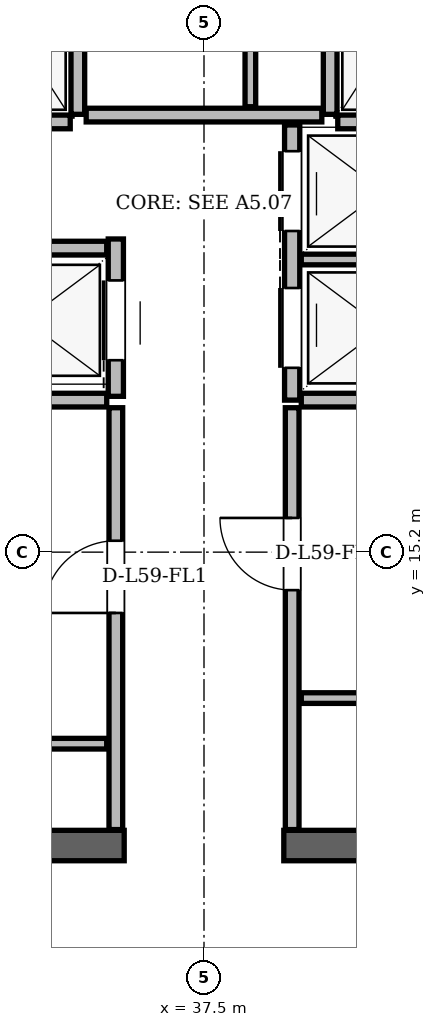
"""IFC4 building model, lengths in metres.
Left out: names, types, materials, properties, quantities, classifications, styles, units other than length and angle.
Written with IfcOpenShell. Run it as: python <this file> out.ifc"""

import sys

from ifc_helpers import new_model, si_unit, direction, frame, frame_2d, origin, place, context, subcontext, project, spatial, rectangle, extrude, element, fill, save


model = new_model("IFC4")
c1 = context("Model", 3, precision=1e-05, world=origin(), true_north=direction((0.0, 1.0)))
c2 = subcontext(c1, "Body", "Model", "MODEL_VIEW")
j1 = project(units=[si_unit("LENGTHUNIT", "METRE"), si_unit("PLANEANGLEUNIT", "RADIAN")], contexts=[c1])
p1 = place(None, origin())
s1 = spatial("IfcSite", under=j1, at=p1, CompositionType="ELEMENT")
p2 = place(p1, origin())
s2 = spatial("IfcBuilding", under=s1, at=p2, CompositionType="ELEMENT")
p3 = place(p2, frame((0.0, 0.0, 223.5)))
s3 = spatial("IfcBuildingStorey", under=s2, at=p3, CompositionType="ELEMENT", Elevation=223.5)
for number, where, z_axis, x_axis in (
    (1, (29.35, 11.34, 0.0), (0.0, 0.0, 1.0), (1.0, 0.0, 0.0)),
    (2, (38.55, 11.34, 0.0), (0.0, 0.0, 1.0), (1.0, 0.0, 0.0)),
):
    element("IfcWall", number, at=place(p3, frame(where, z_axis=z_axis, x_axis=x_axis)), inside=s3, PredefinedType="SHEAR", context=c2, shape_type="SweptSolid", body=[
        extrude(rectangle(XDim=7.1, YDim=0.4, at=frame_2d((3.55, 0.0))), origin(), (0.0, 0.0, 1.0), 3.38),
    ])
p4 = place(p3, frame((35.84, 20.96, 0.0), z_axis=(0.0, 0.0, 1.0), x_axis=(0.0, 1.0, 0.0)))
e3 = element("IfcWall", 3, at=p4, inside=s3, PredefinedType="PARTITIONING", context=c2, shape_type="SweptSolid", body=[
    extrude(rectangle(XDim=3.02, YDim=0.18, at=frame_2d((1.51, 0.0))), origin(), (0.0, 0.0, 1.0), 3.38),
])
p5 = place(p3, frame((34.16, 20.86, 0.0), z_axis=(0.0, 0.0, 1.0), x_axis=(1.0, 0.0, 0.0)))
e4 = element("IfcWall", 4, at=p5, inside=s3, PredefinedType="PARTITIONING", context=c2, shape_type="SweptSolid", body=[
    extrude(rectangle(XDim=1.58, YDim=0.18, at=frame_2d((0.79, 0.0))), origin(), (0.0, 0.0, 1.0), 3.38),
])
p6 = place(p3, frame((39.16, 20.96, 0.0), z_axis=(0.0, 0.0, 1.0), x_axis=(0.0, 1.0, 0.0)))
e5 = element("IfcWall", 5, at=p6, inside=s3, PredefinedType="PARTITIONING", context=c2, shape_type="SweptSolid", body=[
    extrude(rectangle(XDim=3.02, YDim=0.18, at=frame_2d((1.51, 0.0))), origin(), (0.0, 0.0, 1.0), 3.38),
])
p7 = place(p3, frame((39.26, 20.86, 0.0), z_axis=(0.0, 0.0, 1.0), x_axis=(1.0, 0.0, 0.0)))
e6 = element("IfcWall", 6, at=p7, inside=s3, PredefinedType="PARTITIONING", context=c2, shape_type="SweptSolid", body=[
    extrude(rectangle(XDim=1.58, YDim=0.18, at=frame_2d((0.79, 0.0))), origin(), (0.0, 0.0, 1.0), 3.38),
])
p8 = place(p3, frame((36.34, 17.25, 0.0), z_axis=(0.0, 0.0, 1.0), x_axis=(0.0, 1.0, 0.0)))
e7 = element("IfcWall", 7, at=p8, inside=s3, PredefinedType="PARTITIONING", context=c2, shape_type="SweptSolid", body=[
    extrude(rectangle(XDim=2.07, YDim=0.2, at=frame_2d((1.035, 0.0))), origin(), (0.0, 0.0, 1.0), 3.38),
])
p9 = place(p8, frame((0.475, 0.0, 0.0)))
e8 = element("IfcOpeningElement", 8, at=p9, cuts=e7, PredefinedType="OPENING", context=c2, shape_type="SweptSolid", body=[
    extrude(rectangle(XDim=1.05, YDim=2.15, at=frame_2d((0.525, 1.075))), frame((0.0, 0.1, 0.0), z_axis=(0.0, -1.0, 0.0), x_axis=(1.0, 0.0, 0.0)), (0.0, 0.0, 1.0), 0.2),
])
p10 = place(p3, frame((33.95, 19.2, 0.0), z_axis=(0.0, 0.0, 1.0), x_axis=(1.0, 0.0, 0.0)))
e9 = element("IfcWall", 9, at=p10, inside=s3, PredefinedType="PARTITIONING", context=c2, shape_type="SweptSolid", body=[
    extrude(rectangle(XDim=2.27, YDim=0.18, at=frame_2d((1.135, 0.0))), origin(), (0.0, 0.0, 1.0), 3.38),
])
p11 = place(p3, frame((33.56, 17.2, 0.0), z_axis=(0.0, 0.0, 1.0), x_axis=(1.0, 0.0, 0.0)))
e10 = element("IfcWall", 10, at=p11, inside=s3, PredefinedType="PARTITIONING", context=c2, shape_type="SweptSolid", body=[
    extrude(rectangle(XDim=2.66, YDim=0.18, at=frame_2d((1.33, 0.0))), origin(), (0.0, 0.0, 1.0), 3.38),
])
p12 = place(p3, frame((36.34, 11.55, 0.0), z_axis=(0.0, 0.0, 1.0), x_axis=(0.0, 1.0, 0.0)))
e11 = element("IfcWall", 11, at=p12, inside=s3, PredefinedType="PARTITIONING", context=c2, shape_type="SweptSolid", body=[
    extrude(rectangle(XDim=5.55, YDim=0.18, at=frame_2d((2.775, 0.0))), origin(), (0.0, 0.0, 1.0), 3.38),
])
p13 = place(p12, frame((2.85, 0.0, 0.0)))
e12 = element("IfcOpeningElement", 12, at=p13, cuts=e11, PredefinedType="OPENING", context=c2, shape_type="SweptSolid", body=[
    extrude(rectangle(XDim=0.95, YDim=2.1, at=frame_2d((0.475, 1.05))), frame((0.0, 0.09, 0.0), z_axis=(0.0, -1.0, 0.0), x_axis=(1.0, 0.0, 0.0)), (0.0, 0.0, 1.0), 0.18),
])
p14 = place(p3, frame((33.56, 12.68, 0.0), z_axis=(0.0, 0.0, 1.0), x_axis=(1.0, 0.0, 0.0)))
e13 = element("IfcWall", 13, at=p14, inside=s3, PredefinedType="PARTITIONING", context=c2, shape_type="SweptSolid", body=[
    extrude(rectangle(XDim=2.66, YDim=0.14, at=frame_2d((1.33, 0.0))), origin(), (0.0, 0.0, 1.0), 3.38),
])
p15 = place(p3, frame((38.66, 17.2, 0.0), z_axis=(0.0, 0.0, 1.0), x_axis=(0.0, 1.0, 0.0)))
e14 = element("IfcWall", 14, at=p15, inside=s3, PredefinedType="PARTITIONING", context=c2, shape_type="SweptSolid", body=[
    extrude(rectangle(XDim=3.62, YDim=0.2, at=frame_2d((1.81, 0.0))), origin(), (0.0, 0.0, 1.0), 3.38),
])
p16 = place(p15, frame((0.425, 0.0, 0.0)))
e15 = element("IfcOpeningElement", 15, at=p16, cuts=e14, PredefinedType="OPENING", context=c2, shape_type="SweptSolid", body=[
    extrude(rectangle(XDim=1.05, YDim=2.15, at=frame_2d((0.525, 1.075))), frame((0.0, 0.1, 0.0), z_axis=(0.0, -1.0, 0.0), x_axis=(1.0, 0.0, 0.0)), (0.0, 0.0, 1.0), 0.2),
])
p17 = place(p15, frame((2.225, 0.0, 0.0)))
e16 = element("IfcOpeningElement", 16, at=p17, cuts=e14, PredefinedType="OPENING", context=c2, shape_type="SweptSolid", body=[
    extrude(rectangle(XDim=1.05, YDim=2.15, at=frame_2d((0.525, 1.075))), frame((0.0, 0.1, 0.0), z_axis=(0.0, -1.0, 0.0), x_axis=(1.0, 0.0, 0.0)), (0.0, 0.0, 1.0), 0.2),
])
p18 = place(p3, frame((38.78, 17.2, 0.0), z_axis=(0.0, 0.0, 1.0), x_axis=(1.0, 0.0, 0.0)))
e17 = element("IfcWall", 17, at=p18, inside=s3, PredefinedType="PARTITIONING", context=c2, shape_type="SweptSolid", body=[
    extrude(rectangle(XDim=2.66, YDim=0.18, at=frame_2d((1.33, 0.0))), origin(), (0.0, 0.0, 1.0), 3.38),
])
p19 = place(p3, frame((38.78, 19.05, 0.0), z_axis=(0.0, 0.0, 1.0), x_axis=(1.0, 0.0, 0.0)))
e18 = element("IfcWall", 18, at=p19, inside=s3, PredefinedType="PARTITIONING", context=c2, shape_type="SweptSolid", body=[
    extrude(rectangle(XDim=2.66, YDim=0.14, at=frame_2d((1.33, 0.0))), origin(), (0.0, 0.0, 1.0), 3.38),
])
p20 = place(p3, frame((38.66, 11.55, 0.0), z_axis=(0.0, 0.0, 1.0), x_axis=(0.0, 1.0, 0.0)))
e19 = element("IfcWall", 19, at=p20, inside=s3, PredefinedType="PARTITIONING", context=c2, shape_type="SweptSolid", body=[
    extrude(rectangle(XDim=5.55, YDim=0.18, at=frame_2d((2.775, 0.0))), origin(), (0.0, 0.0, 1.0), 3.38),
])
p21 = place(p20, frame((3.15, 0.0, 0.0)))
e20 = element("IfcOpeningElement", 20, at=p21, cuts=e19, PredefinedType="OPENING", context=c2, shape_type="SweptSolid", body=[
    extrude(rectangle(XDim=0.95, YDim=2.1, at=frame_2d((0.475, 1.05))), frame((0.0, 0.09, 0.0), z_axis=(0.0, -1.0, 0.0), x_axis=(1.0, 0.0, 0.0)), (0.0, 0.0, 1.0), 0.18),
])
p22 = place(p3, frame((38.78, 13.28, 0.0), z_axis=(0.0, 0.0, 1.0), x_axis=(1.0, 0.0, 0.0)))
e21 = element("IfcWall", 21, at=p22, inside=s3, PredefinedType="PARTITIONING", context=c2, shape_type="SweptSolid", body=[
    extrude(rectangle(XDim=2.66, YDim=0.14, at=frame_2d((1.33, 0.0))), origin(), (0.0, 0.0, 1.0), 3.38),
])
p23 = place(p3, frame((35.95, 20.95, 0.0), z_axis=(0.0, 0.0, 1.0), x_axis=(1.0, 0.0, 0.0)))
e22 = element("IfcWall", 22, at=p23, inside=s3, PredefinedType="PARTITIONING", context=c2, shape_type="SweptSolid", body=[
    extrude(rectangle(XDim=3.1, YDim=0.18, at=frame_2d((1.55, 0.0))), origin(), (0.0, 0.0, 1.0), 3.38),
])
p24 = place(p3, frame((38.11, 21.06, 0.0), z_axis=(0.0, 0.0, 1.0), x_axis=(0.0, 1.0, 0.0)))
e23 = element("IfcWall", 23, at=p24, inside=s3, PredefinedType="PARTITIONING", context=c2, shape_type="SweptSolid", body=[
    extrude(rectangle(XDim=2.92, YDim=0.14, at=frame_2d((1.46, 0.0))), origin(), (0.0, 0.0, 1.0), 3.38),
])
p25 = place(p13, origin())
e24 = element("IfcDoor", 24, at=p25, inside=s3, OperationType="SINGLE_SWING_LEFT", PredefinedType="DOOR", context=c2, shape_type="SweptSolid", body=[
    extrude(rectangle(XDim=0.95, YDim=2.1, at=frame_2d((0.475, 1.05))), frame((0.0, 0.025, 0.0), z_axis=(0.0, -1.0, 0.0), x_axis=(1.0, 0.0, 0.0)), (0.0, 0.0, 1.0), 0.05),
])
fill(e12, e24)
p26 = place(p21, origin())
e25 = element("IfcDoor", 25, at=p26, inside=s3, OperationType="SINGLE_SWING_RIGHT", PredefinedType="DOOR", context=c2, shape_type="SweptSolid", body=[
    extrude(rectangle(XDim=0.95, YDim=2.1, at=frame_2d((0.475, 1.05))), frame((0.0, 0.025, 0.0), z_axis=(0.0, -1.0, 0.0), x_axis=(1.0, 0.0, 0.0)), (0.0, 0.0, 1.0), 0.05),
])
fill(e20, e25)
p27 = place(p9, origin())
e26 = element("IfcDoor", 26, at=p27, inside=s3, OperationType="SLIDING_TO_LEFT", PredefinedType="DOOR", context=c2, shape_type="SweptSolid", body=[
    extrude(rectangle(XDim=1.05, YDim=2.15, at=frame_2d((0.525, 1.075))), frame((0.0, 0.025, 0.0), z_axis=(0.0, -1.0, 0.0), x_axis=(1.0, 0.0, 0.0)), (0.0, 0.0, 1.0), 0.05),
])
fill(e8, e26)
p28 = place(p16, origin())
e27 = element("IfcDoor", 27, at=p28, inside=s3, OperationType="SLIDING_TO_RIGHT", PredefinedType="DOOR", context=c2, shape_type="SweptSolid", body=[
    extrude(rectangle(XDim=1.05, YDim=2.15, at=frame_2d((0.525, 1.075))), frame((0.0, 0.025, 0.0), z_axis=(0.0, -1.0, 0.0), x_axis=(1.0, 0.0, 0.0)), (0.0, 0.0, 1.0), 0.05),
])
fill(e15, e27)
p29 = place(p17, origin())
e28 = element("IfcDoor", 28, at=p29, inside=s3, OperationType="SLIDING_TO_LEFT", PredefinedType="DOOR", context=c2, shape_type="SweptSolid", body=[
    extrude(rectangle(XDim=1.05, YDim=2.15, at=frame_2d((0.525, 1.075))), frame((0.0, 0.025, 0.0), z_axis=(0.0, -1.0, 0.0), x_axis=(1.0, 0.0, 0.0)), (0.0, 0.0, 1.0), 0.05),
])
fill(e16, e28)
save(model, sys.argv[1])
